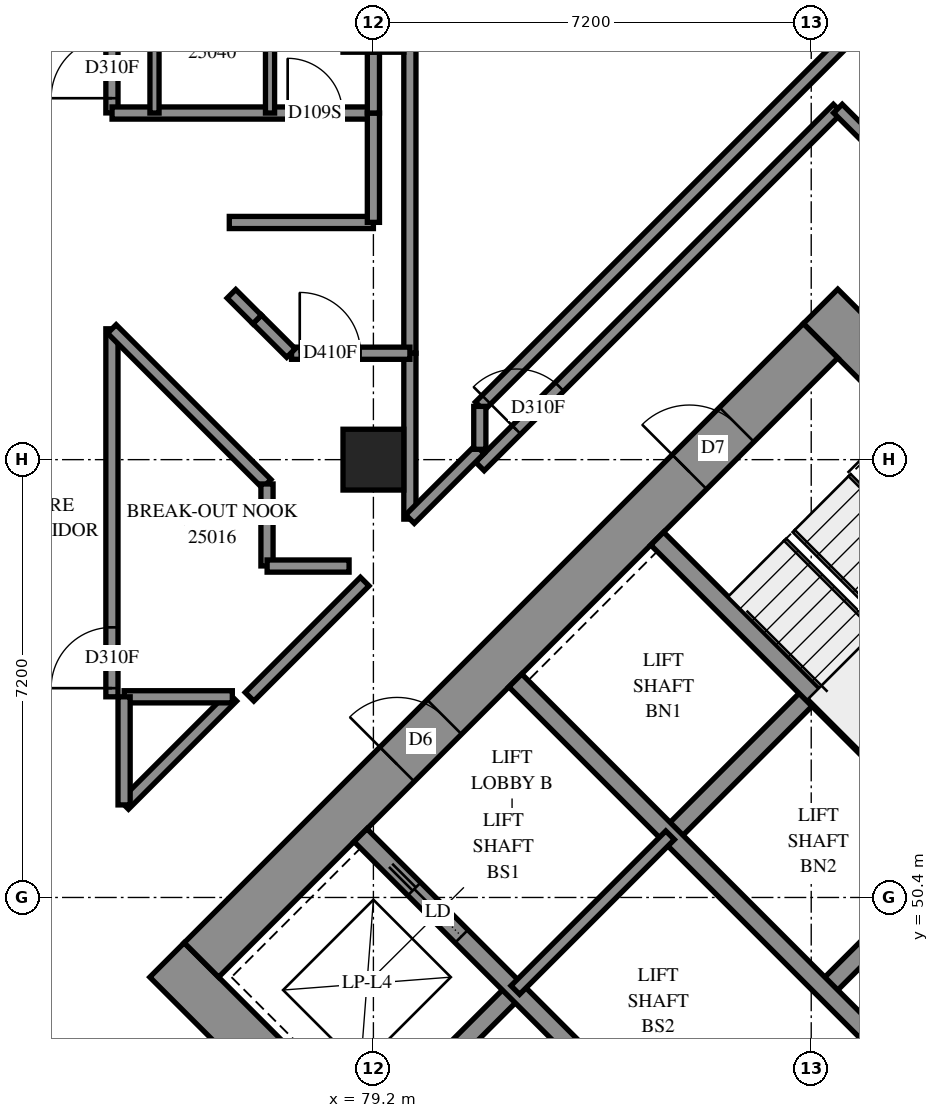
"""IFC4 building model, lengths in metres.
Left out: names, types, materials, properties, quantities, classifications, styles, units other than length and angle.
Written with IfcOpenShell. Run it as: python <this file> out.ifc"""

import sys

from ifc_helpers import new_model, si_unit, direction, frame, frame_2d, origin, origin_2d, place, context, subcontext, project, spatial, polyline, rectangle, outline, extrude, element, fill, save


model = new_model("IFC4")
c1 = context("Model", 3, precision=1e-05, world=origin(), true_north=direction((0.0, 1.0)))
c2 = subcontext(c1, "Body", "Model", "MODEL_VIEW")
j1 = project(units=[si_unit("LENGTHUNIT", "METRE"), si_unit("PLANEANGLEUNIT", "RADIAN")], contexts=[c1])
p1 = place(None, origin())
s1 = spatial("IfcSite", under=j1, at=p1, CompositionType="ELEMENT")
p2 = place(p1, origin())
s2 = spatial("IfcBuilding", under=s1, at=p2, CompositionType="ELEMENT")
p3 = place(p2, frame((0.0, 0.0, 94.8)))
s3 = spatial("IfcBuildingStorey", under=s2, at=p3, CompositionType="ELEMENT", Elevation=94.8)
p4 = place(p3, frame((79.2, 57.6, 0.0), z_axis=(0.0, 0.0, 1.0), x_axis=(1.0, 0.0, 0.0)))
e1 = element("IfcColumn", 1, at=p4, inside=s3, PredefinedType="COLUMN", context=c2, shape_type="SweptSolid", body=[
    extrude(rectangle(XDim=1.0, YDim=1.0, at=origin_2d()), origin(), (0.0, 0.0, 1.0), 3.1),
])
p5 = place(p3, frame((75.806, 49.373, -0.3), z_axis=(0.0, 0.0, 1.0), x_axis=(0.7071067812, -0.7071067812, 0.0)))
e2 = element("IfcWall", 2, at=p5, inside=s3, PredefinedType="SHEAR", context=c2, shape_type="SweptSolid", body=[
    extrude(rectangle(XDim=16.0, YDim=0.8, at=frame_2d((8.0, 0.0))), origin(), (0.0, 0.0, 1.0), 2.7),
])
p6 = place(p3, frame((86.554, 60.121, -0.3), z_axis=(0.0, 0.0, 1.0), x_axis=(0.7071067812, -0.7071067812, 0.0)))
e3 = element("IfcWall", 3, at=p6, inside=s3, PredefinedType="SHEAR", context=c2, shape_type="SweptSolid", body=[
    extrude(rectangle(XDim=16.0, YDim=0.8, at=frame_2d((8.0, 0.0))), origin(), (0.0, 0.0, 1.0), 2.7),
])
p7 = place(p6, frame((10.8, 0.0, 0.3)))
e4 = element("IfcOpeningElement", 4, at=p7, cuts=e3, PredefinedType="OPENING", context=c2, shape_type="SweptSolid", body=[
    extrude(rectangle(XDim=0.8, YDim=2.1, at=frame_2d((0.4, 1.05))), frame((0.0, 0.41, 0.0), z_axis=(0.0, -1.0, 0.0), x_axis=(1.0, 0.0, 0.0)), (0.0, 0.0, 1.0), 0.82),
])
p8 = place(p3, frame((76.372, 49.373, -0.3), z_axis=(0.0, 0.0, 1.0), x_axis=(0.7071067812, 0.7071067812, 0.0)))
e5 = element("IfcWall", 5, at=p8, inside=s3, PredefinedType="SHEAR", context=c2, shape_type="SweptSolid", body=[
    extrude(rectangle(XDim=14.4, YDim=0.8, at=frame_2d((7.2, 0.0))), origin(), (0.0, 0.0, 1.0), 2.7),
])
p9 = place(p8, frame((4.55, 0.0, 0.3)))
e6 = element("IfcOpeningElement", 6, at=p9, cuts=e5, PredefinedType="OPENING", context=c2, shape_type="SweptSolid", body=[
    extrude(rectangle(XDim=1.1, YDim=2.1, at=frame_2d((0.55, 1.05))), frame((0.0, 0.41, 0.0), z_axis=(0.0, -1.0, 0.0), x_axis=(1.0, 0.0, 0.0)), (0.0, 0.0, 1.0), 0.82),
])
p10 = place(p8, frame((11.35, 0.0, 0.3)))
e7 = element("IfcOpeningElement", 7, at=p10, cuts=e5, PredefinedType="OPENING", context=c2, shape_type="SweptSolid", body=[
    extrude(rectangle(XDim=1.1, YDim=2.1, at=frame_2d((0.55, 1.05))), frame((0.0, 0.41, 0.0), z_axis=(0.0, -1.0, 0.0), x_axis=(1.0, 0.0, 0.0)), (0.0, 0.0, 1.0), 0.82),
])
p11 = place(p3, frame((87.12, 38.625, -0.3), z_axis=(0.0, 0.0, 1.0), x_axis=(0.7071067812, 0.7071067812, 0.0)))
e8 = element("IfcWall", 8, at=p11, inside=s3, PredefinedType="SHEAR", context=c2, shape_type="SweptSolid", body=[
    extrude(rectangle(XDim=14.4, YDim=0.8, at=frame_2d((7.2, 0.0))), origin(), (0.0, 0.0, 1.0), 2.7),
])
p12 = place(p11, frame((4.55, 0.0, 0.3)))
e9 = element("IfcOpeningElement", 9, at=p12, cuts=e8, PredefinedType="OPENING", context=c2, shape_type="SweptSolid", body=[
    extrude(rectangle(XDim=1.1, YDim=2.1, at=frame_2d((0.55, 1.05))), frame((0.0, 0.41, 0.0), z_axis=(0.0, -1.0, 0.0), x_axis=(1.0, 0.0, 0.0)), (0.0, 0.0, 1.0), 0.82),
])
p13 = place(p11, frame((11.35, 0.0, 0.3)))
e10 = element("IfcOpeningElement", 10, at=p13, cuts=e8, PredefinedType="OPENING", context=c2, shape_type="SweptSolid", body=[
    extrude(rectangle(XDim=1.1, YDim=2.1, at=frame_2d((0.55, 1.05))), frame((0.0, 0.41, 0.0), z_axis=(0.0, -1.0, 0.0), x_axis=(1.0, 0.0, 0.0)), (0.0, 0.0, 1.0), 0.82),
])
for number, where, z_axis, x_axis in (
    (11, (79.2, 46.544, 0.0), (0.0, 0.0, 1.0), (0.707, 0.707, 0.0)),
    (12, (84.079, 51.423, 0.0), (0.0, 0.0, 1.0), (0.707, 0.707, 0.0)),
):
    element("IfcWall", number, at=place(p3, frame(where, z_axis=z_axis, x_axis=x_axis)), inside=s3, PredefinedType="SOLIDWALL", context=c2, shape_type="SweptSolid", body=[
        extrude(rectangle(XDim=3.3, YDim=0.3, at=frame_2d((1.65, 0.0))), origin(), (0.0, 0.0, 1.0), 3.1),
    ])
p14 = place(p3, frame((86.625, 48.878, 0.0), z_axis=(0.0, 0.0, 1.0), x_axis=(0.7071067812, 0.7071067812, 0.0)))
e13 = element("IfcWall", 13, at=p14, inside=s3, PredefinedType="SOLIDWALL", context=c2, shape_type="SweptSolid", body=[
    extrude(rectangle(XDim=3.3, YDim=0.3, at=frame_2d((1.65, 0.0))), origin(), (0.0, 0.0, 1.0), 3.1),
])
p15 = place(p3, frame((78.988, 51.423, 0.0), z_axis=(0.0, 0.0, 1.0), x_axis=(0.7071067812, -0.7071067812, 0.0)))
e14 = element("IfcWall", 14, at=p15, inside=s3, PredefinedType="SOLIDWALL", context=c2, shape_type="SweptSolid", body=[
    extrude(rectangle(XDim=14.4, YDim=0.3, at=frame_2d((7.2, 0.0))), origin(), (0.0, 0.0, 1.0), 3.1),
])
p16 = place(p15, frame((1.25, 0.0, 0.0)))
e15 = element("IfcOpeningElement", 15, at=p16, cuts=e14, PredefinedType="OPENING", context=c2, shape_type="SweptSolid", body=[
    extrude(rectangle(XDim=1.1, YDim=2.1, at=frame_2d((0.55, 1.05))), frame((0.0, 0.16, 0.0), z_axis=(0.0, -1.0, 0.0), x_axis=(1.0, 0.0, 0.0)), (0.0, 0.0, 1.0), 0.32),
])
p17 = place(p15, frame((4.85, 0.0, 0.0)))
e16 = element("IfcOpeningElement", 16, at=p17, cuts=e14, PredefinedType="OPENING", context=c2, shape_type="SweptSolid", body=[
    extrude(rectangle(XDim=1.1, YDim=2.1, at=frame_2d((0.55, 1.05))), frame((0.0, 0.16, 0.0), z_axis=(0.0, -1.0, 0.0), x_axis=(1.0, 0.0, 0.0)), (0.0, 0.0, 1.0), 0.32),
])
p18 = place(p15, frame((8.45, 0.0, 0.0)))
e17 = element("IfcOpeningElement", 17, at=p18, cuts=e14, PredefinedType="OPENING", context=c2, shape_type="SweptSolid", body=[
    extrude(rectangle(XDim=1.1, YDim=2.1, at=frame_2d((0.55, 1.05))), frame((0.0, 0.16, 0.0), z_axis=(0.0, -1.0, 0.0), x_axis=(1.0, 0.0, 0.0)), (0.0, 0.0, 1.0), 0.32),
])
p19 = place(p15, frame((12.05, 0.0, 0.0)))
e18 = element("IfcOpeningElement", 18, at=p19, cuts=e14, PredefinedType="OPENING", context=c2, shape_type="SweptSolid", body=[
    extrude(rectangle(XDim=1.1, YDim=2.1, at=frame_2d((0.55, 1.05))), frame((0.0, 0.16, 0.0), z_axis=(0.0, -1.0, 0.0), x_axis=(1.0, 0.0, 0.0)), (0.0, 0.0, 1.0), 0.32),
])
p20 = place(p3, frame((81.534, 53.969, 0.0), z_axis=(0.0, 0.0, 1.0), x_axis=(0.707103309, -0.7071102534, 0.0)))
e19 = element("IfcWall", 19, at=p20, inside=s3, PredefinedType="SOLIDWALL", context=c2, shape_type="SweptSolid", body=[
    extrude(rectangle(XDim=14.4, YDim=0.3, at=frame_2d((7.2, 0.0))), origin(), (0.0, 0.0, 1.0), 3.1),
])
p21 = place(p20, frame((12.05, 0.0, 0.0)))
e20 = element("IfcOpeningElement", 20, at=p21, cuts=e19, PredefinedType="OPENING", context=c2, shape_type="SweptSolid", body=[
    extrude(rectangle(XDim=1.1, YDim=2.1, at=frame_2d((0.55, 1.05))), frame((0.0, 0.16, 0.0), z_axis=(0.0, -1.0, 0.0), x_axis=(1.0, 0.0, 0.0)), (0.0, 0.0, 1.0), 0.32),
])
p22 = place(p3, frame((83.867, 56.302, 0.0), z_axis=(0.0, 0.0, 1.0), x_axis=(0.7071137256, -0.7070998367, 0.0)))
e21 = element("IfcWall", 21, at=p22, inside=s3, PredefinedType="SOLIDWALL", context=c2, shape_type="SweptSolid", body=[
    extrude(rectangle(XDim=7.2, YDim=0.3, at=frame_2d((3.6, 0.0))), origin(), (0.0, 0.0, 1.0), 3.1),
])
p23 = place(p3, frame((89.141, 63.96, 0.0), z_axis=(0.0, 0.0, 1.0), x_axis=(-0.788454577, 0.6150929849, 0.0)))
e22 = element("IfcWall", 22, at=p23, inside=s3, PredefinedType="SOLIDWALL", context=c2, shape_type="SweptSolid", body=[
    extrude(outline(polyline([(-0.034, -0.275), (3.401, -0.275), (3.468, 0.275), (0.034, 0.275), (-0.034, -0.275)])), origin(), (0.0, 0.0, 1.0), 3.1),
])
p24 = place(p23, frame((0.481, 0.0, 0.5)))
e23 = element("IfcOpeningElement", 23, at=p24, cuts=e22, PredefinedType="OPENING", context=c2, shape_type="SweptSolid", body=[
    extrude(rectangle(XDim=1.2, YDim=2.45, at=frame_2d((0.6, 1.225))), frame((0.0, 0.285, 0.0), z_axis=(0.0, -1.0, 0.0), x_axis=(1.0, 0.0, 0.0)), (0.0, 0.0, 1.0), 0.57),
])
p25 = place(p3, frame((81.534, 48.878, 0.0), z_axis=(0.0, 0.0, 1.0), x_axis=(0.707092892, 0.7071206701, 0.0)))
e24 = element("IfcWall", 24, at=p25, inside=s3, PredefinedType="PARTITIONING", context=c2, shape_type="SweptSolid", body=[
    extrude(rectangle(XDim=3.6, YDim=0.2, at=frame_2d((1.8, 0.0))), origin(), (0.0, 0.0, 1.0), 3.1),
])
p26 = place(p3, frame((79.8, 59.35, 0.0), z_axis=(0.0, 0.0, 1.0), x_axis=(0.0, 1.0, 0.0)))
e25 = element("IfcWall", 25, at=p26, inside=s3, PredefinedType="PARTITIONING", context=c2, shape_type="SweptSolid", body=[
    extrude(rectangle(XDim=14.215, YDim=0.2, at=frame_2d((7.108, 0.0))), origin(), (0.0, 0.0, 1.0), 3.1),
])
p27 = place(p3, frame((80.949, 58.477, 0.0), z_axis=(0.0, 0.0, 1.0), x_axis=(0.7071122423, 0.7071013201, 0.0)))
e26 = element("IfcWall", 26, at=p27, inside=s3, PredefinedType="PARTITIONING", context=c2, shape_type="SweptSolid", body=[
    extrude(rectangle(XDim=9.156, YDim=0.2, at=frame_2d((4.578, 0.0))), origin(), (0.0, 0.0, 1.0), 3.1),
])
p28 = place(p3, frame((80.951, 57.489, 0.0), z_axis=(0.0, 0.0, 1.0), x_axis=(0.7071067812, 0.7071067812, 0.0)))
e27 = element("IfcWall", 27, at=p28, inside=s3, PredefinedType="PARTITIONING", context=c2, shape_type="SweptSolid", body=[
    extrude(rectangle(XDim=8.321, YDim=0.2, at=frame_2d((4.161, 0.0))), origin(), (0.0, 0.0, 1.0), 3.1),
])
p29 = place(p28, frame((0.851, 0.0, 0.0)))
e28 = element("IfcOpeningElement", 28, at=p29, cuts=e27, PredefinedType="OPENING", context=c2, shape_type="SweptSolid", body=[
    extrude(rectangle(XDim=1.0, YDim=2.1, at=frame_2d((0.5, 1.05))), frame((0.0, 0.11, 0.0), z_axis=(0.0, -1.0, 0.0), x_axis=(1.0, 0.0, 0.0)), (0.0, 0.0, 1.0), 0.22),
])
p30 = place(p3, frame((74.9, 53.7, 0.0), z_axis=(0.0, 0.0, 1.0), x_axis=(0.0, 1.0, 0.0)))
e29 = element("IfcWall", 29, at=p30, inside=s3, PredefinedType="PARTITIONING", context=c2, shape_type="SweptSolid", body=[
    extrude(rectangle(XDim=6.052, YDim=0.2, at=frame_2d((3.026, 0.0))), origin(), (0.0, 0.0, 1.0), 3.1),
])
p31 = place(p30, frame((0.142, 0.0, 0.0)))
e30 = element("IfcOpeningElement", 30, at=p31, cuts=e29, PredefinedType="OPENING", context=c2, shape_type="SweptSolid", body=[
    extrude(rectangle(XDim=1.0, YDim=2.1, at=frame_2d((0.5, 1.05))), frame((0.0, 0.11, 0.0), z_axis=(0.0, -1.0, 0.0), x_axis=(1.0, 0.0, 0.0)), (0.0, 0.0, 1.0), 0.22),
])
p32 = place(p3, frame((74.9, 63.302, 0.0), z_axis=(0.0, 0.0, 1.0), x_axis=(0.0, 1.0, 0.0)))
e31 = element("IfcWall", 31, at=p32, inside=s3, PredefinedType="PARTITIONING", context=c2, shape_type="SweptSolid", body=[
    extrude(rectangle(XDim=4.398, YDim=0.2, at=frame_2d((2.199, 0.0))), origin(), (0.0, 0.0, 1.0), 3.1),
])
p33 = place(p32, frame((0.242, 0.0, 0.0)))
e32 = element("IfcOpeningElement", 32, at=p33, cuts=e31, PredefinedType="OPENING", context=c2, shape_type="SweptSolid", body=[
    extrude(rectangle(XDim=1.0, YDim=2.1, at=frame_2d((0.5, 1.05))), frame((0.0, 0.11, 0.0), z_axis=(0.0, -1.0, 0.0), x_axis=(1.0, 0.0, 0.0)), (0.0, 0.0, 1.0), 0.22),
])
p34 = place(p3, frame((74.902, 63.3, 0.0), z_axis=(0.0, 0.0, 1.0), x_axis=(1.0, 0.0, 0.0)))
e33 = element("IfcWall", 33, at=p34, inside=s3, PredefinedType="PARTITIONING", context=c2, shape_type="SweptSolid", body=[
    extrude(rectangle(XDim=4.298, YDim=0.2, at=frame_2d((2.149, 0.0))), origin(), (0.0, 0.0, 1.0), 3.1),
])
p35 = place(p34, frame((2.888, 0.0, 0.0)))
e34 = element("IfcOpeningElement", 34, at=p35, cuts=e33, PredefinedType="OPENING", context=c2, shape_type="SweptSolid", body=[
    extrude(rectangle(XDim=0.9, YDim=2.1, at=frame_2d((0.45, 1.05))), frame((0.0, 0.11, 0.0), z_axis=(0.0, -1.0, 0.0), x_axis=(1.0, 0.0, 0.0)), (0.0, 0.0, 1.0), 0.22),
])
p36 = place(p3, frame((74.899, 59.749, 0.0), z_axis=(0.0, 0.0, 1.0), x_axis=(0.7071067812, -0.7071067812, 0.0)))
e35 = element("IfcWall", 35, at=p36, inside=s3, PredefinedType="PARTITIONING", context=c2, shape_type="SweptSolid", body=[
    extrude(rectangle(XDim=3.601, YDim=0.2, at=frame_2d((1.8, 0.0))), origin(), (0.0, 0.0, 1.0), 3.1),
])
p37 = place(p3, frame((79.8, 56.622, 0.0), z_axis=(0.0, 0.0, 1.0), x_axis=(0.0, 1.0, 0.0)))
e36 = element("IfcWall", 36, at=p37, inside=s3, PredefinedType="PARTITIONING", context=c2, shape_type="SweptSolid", body=[
    extrude(rectangle(XDim=2.728, YDim=0.2, at=frame_2d((1.364, 0.0))), origin(), (0.0, 0.0, 1.0), 3.1),
])
p38 = place(p3, frame((77.163, 53.701, 0.0), z_axis=(0.0, 0.0, 1.0), x_axis=(0.7071067812, 0.7071067812, 0.0)))
e37 = element("IfcWall", 37, at=p38, inside=s3, PredefinedType="PARTITIONING", context=c2, shape_type="SweptSolid", body=[
    extrude(rectangle(XDim=2.679, YDim=0.2, at=frame_2d((1.339, 0.0))), origin(), (0.0, 0.0, 1.0), 3.1),
])
p39 = place(p3, frame((75.102, 51.922, 0.0), z_axis=(0.0, 0.0, 1.0), x_axis=(0.7071067812, 0.7071067812, 0.0)))
e38 = element("IfcWall", 38, at=p39, inside=s3, PredefinedType="PARTITIONING", context=c2, shape_type="SweptSolid", body=[
    extrude(rectangle(XDim=2.514, YDim=0.2, at=frame_2d((1.257, 0.0))), origin(), (0.0, 0.0, 1.0), 3.1),
])
for number, where, z_axis, x_axis in (
    (39, (75.6, 63.3, 0.0), (0.0, 0.0, 1.0), (0.0, 1.0, 0.0)),
    (40, (77.5, 63.3, 0.0), (0.0, 0.0, 1.0), (0.0, 1.0, 0.0)),
):
    element("IfcWall", number, at=place(p3, frame(where, z_axis=z_axis, x_axis=x_axis)), inside=s3, PredefinedType="PARTITIONING", context=c2, shape_type="SweptSolid", body=[
        extrude(rectangle(XDim=2.4, YDim=0.15, at=frame_2d((1.2, 0.0))), origin(), (0.0, 0.0, 1.0), 3.1),
    ])
p40 = place(p3, frame((76.83, 61.5, 0.0), z_axis=(0.0, 0.0, 1.0), x_axis=(1.0, 0.0, 0.0)))
e41 = element("IfcWall", 41, at=p40, inside=s3, PredefinedType="PARTITIONING", context=c2, shape_type="SweptSolid", body=[
    extrude(rectangle(XDim=2.37, YDim=0.2, at=frame_2d((1.185, 0.0))), origin(), (0.0, 0.0, 1.0), 3.1),
])
p41 = place(p3, frame((77.854, 59.35, 0.0), z_axis=(0.0, 0.0, 1.0), x_axis=(1.0, 0.0, 0.0)))
e42 = element("IfcWall", 42, at=p41, inside=s3, PredefinedType="PARTITIONING", context=c2, shape_type="SweptSolid", body=[
    extrude(rectangle(XDim=1.946, YDim=0.2, at=frame_2d((0.973, 0.0))), origin(), (0.0, 0.0, 1.0), 3.1),
])
p42 = place(p41, frame((0.135, 0.0, 0.0)))
e43 = element("IfcOpeningElement", 43, at=p42, cuts=e42, PredefinedType="OPENING", context=c2, shape_type="SweptSolid", body=[
    extrude(rectangle(XDim=1.0, YDim=2.1, at=frame_2d((0.5, 1.05))), frame((0.0, 0.11, 0.0), z_axis=(0.0, -1.0, 0.0), x_axis=(1.0, 0.0, 0.0)), (0.0, 0.0, 1.0), 0.22),
])
p43 = place(p3, frame((79.2, 61.502, 0.0), z_axis=(0.0, 0.0, 1.0), x_axis=(0.0, 1.0, 0.0)))
e44 = element("IfcWall", 44, at=p43, inside=s3, PredefinedType="PARTITIONING", context=c2, shape_type="SweptSolid", body=[
    extrude(rectangle(XDim=1.798, YDim=0.2, at=frame_2d((0.899, 0.0))), origin(), (0.0, 0.0, 1.0), 3.1),
])
p44 = place(p3, frame((75.1, 53.7, 0.0), z_axis=(0.0, 0.0, 1.0), x_axis=(1.0, 0.0, 0.0)))
e45 = element("IfcWall", 45, at=p44, inside=s3, PredefinedType="PARTITIONING", context=c2, shape_type="SweptSolid", body=[
    extrude(rectangle(XDim=1.78, YDim=0.2, at=frame_2d((0.89, 0.0))), origin(), (0.0, 0.0, 1.0), 3.1),
])
p45 = place(p3, frame((75.1, 51.922, 0.0), z_axis=(0.0, 0.0, 1.0), x_axis=(0.0, 1.0, 0.0)))
e46 = element("IfcWall", 46, at=p45, inside=s3, PredefinedType="PARTITIONING", context=c2, shape_type="SweptSolid", body=[
    extrude(rectangle(XDim=1.778, YDim=0.2, at=frame_2d((0.889, 0.0))), origin(), (0.0, 0.0, 1.0), 3.1),
])
p46 = place(p3, frame((79.802, 56.623, 0.0), z_axis=(0.0, 0.0, 1.0), x_axis=(0.7071067812, 0.7071067812, 0.0)))
e47 = element("IfcWall", 47, at=p46, inside=s3, PredefinedType="PARTITIONING", context=c2, shape_type="SweptSolid", body=[
    extrude(rectangle(XDim=1.623, YDim=0.2, at=frame_2d((0.812, 0.0))), origin(), (0.0, 0.0, 1.0), 3.1),
])
p47 = place(p3, frame((86.839, 63.373, 0.0), z_axis=(0.0, 0.0, 1.0), x_axis=(0.7077963046, -0.7064165847, 0.0)))
e48 = element("IfcWall", 48, at=p47, inside=s3, PredefinedType="PARTITIONING", context=c2, shape_type="SweptSolid", body=[
    extrude(rectangle(XDim=1.45, YDim=0.2, at=frame_2d((0.725, 0.0))), origin(), (0.0, 0.0, 1.0), 3.1),
])
for number, where, z_axis, x_axis in (
    (49, (77.45, 55.852, 0.0), (0.0, 0.0, 1.0), (0.0, 1.0, 0.0)),
    (50, (77.452, 55.85, 0.0), (0.0, 0.0, 1.0), (1.0, 0.0, 0.0)),
):
    element("IfcWall", number, at=place(p3, frame(where, z_axis=z_axis, x_axis=x_axis)), inside=s3, PredefinedType="PARTITIONING", context=c2, shape_type="SweptSolid", body=[
        extrude(rectangle(XDim=1.348, YDim=0.2, at=frame_2d((0.674, 0.0))), origin(), (0.0, 0.0, 1.0), 3.1),
    ])
p48 = place(p3, frame((79.2, 63.3, 0.0), z_axis=(0.0, 0.0, 1.0), x_axis=(0.0, 1.0, 0.0)))
e51 = element("IfcWall", 51, at=p48, inside=s3, PredefinedType="PARTITIONING", context=c2, shape_type="SweptSolid", body=[
    extrude(rectangle(XDim=1.0, YDim=0.2, at=frame_2d((0.5, 0.0))), origin(), (0.0, 0.0, 1.0), 3.1),
])
p49 = place(p3, frame((77.289, 59.907, 0.0), z_axis=(0.0, 0.0, 1.0), x_axis=(0.7083796976, -0.7058315692, 0.0)))
e52 = element("IfcWall", 52, at=p49, inside=s3, PredefinedType="PARTITIONING", context=c2, shape_type="SweptSolid", body=[
    extrude(rectangle(XDim=0.785, YDim=0.2, at=frame_2d((0.393, 0.0))), origin(), (0.0, 0.0, 1.0), 3.1),
])
p50 = place(p3, frame((80.95, 57.77, 0.0), z_axis=(0.0, 0.0, 1.0), x_axis=(0.0, 1.0, 0.0)))
e53 = element("IfcWall", 53, at=p50, inside=s3, PredefinedType="PARTITIONING", context=c2, shape_type="SweptSolid", body=[
    extrude(rectangle(XDim=0.706, YDim=0.2, at=frame_2d((0.353, 0.0))), origin(), (0.0, 0.0, 1.0), 3.1),
])
p51 = place(p3, frame((76.865, 60.327, 0.0), z_axis=(0.0, 0.0, 1.0), x_axis=(0.7071067812, -0.7071067812, 0.0)))
e54 = element("IfcWall", 54, at=p51, inside=s3, PredefinedType="PARTITIONING", context=c2, shape_type="SweptSolid", body=[
    extrude(rectangle(XDim=0.597, YDim=0.2, at=frame_2d((0.298, 0.0))), origin(), (0.0, 0.0, 1.0), 3.1),
])
p52 = place(p9, origin())
e55 = element("IfcDoor", 55, at=p52, inside=s3, OperationType="DOUBLE_DOOR_SINGLE_SWING", PredefinedType="DOOR", context=c2, shape_type="SweptSolid", body=[
    extrude(rectangle(XDim=1.1, YDim=2.1, at=frame_2d((0.55, 1.05))), frame((0.0, 0.025, 0.0), z_axis=(0.0, -1.0, 0.0), x_axis=(1.0, 0.0, 0.0)), (0.0, 0.0, 1.0), 0.05),
])
fill(e6, e55)
p53 = place(p10, origin())
e56 = element("IfcDoor", 56, at=p53, inside=s3, OperationType="SINGLE_SWING_LEFT", PredefinedType="DOOR", context=c2, shape_type="SweptSolid", body=[
    extrude(rectangle(XDim=1.1, YDim=2.1, at=frame_2d((0.55, 1.05))), frame((0.0, 0.025, 0.0), z_axis=(0.0, -1.0, 0.0), x_axis=(1.0, 0.0, 0.0)), (0.0, 0.0, 1.0), 0.05),
])
fill(e7, e56)
p54 = place(p16, origin())
e57 = element("IfcDoor", 57, at=p54, inside=s3, OperationType="SLIDING_TO_LEFT", PredefinedType="DOOR", context=c2, shape_type="SweptSolid", body=[
    extrude(rectangle(XDim=1.1, YDim=2.1, at=frame_2d((0.55, 1.05))), frame((0.0, 0.025, 0.0), z_axis=(0.0, -1.0, 0.0), x_axis=(1.0, 0.0, 0.0)), (0.0, 0.0, 1.0), 0.05),
])
fill(e15, e57)
p55 = place(p31, origin())
e58 = element("IfcDoor", 58, at=p55, inside=s3, OperationType="SINGLE_SWING_LEFT", PredefinedType="DOOR", context=c2, shape_type="SweptSolid", body=[
    extrude(rectangle(XDim=1.0, YDim=2.1, at=frame_2d((0.5, 1.05))), frame((0.0, 0.025, 0.0), z_axis=(0.0, -1.0, 0.0), x_axis=(1.0, 0.0, 0.0)), (0.0, 0.0, 1.0), 0.05),
])
fill(e30, e58)
p56 = place(p33, origin())
e59 = element("IfcDoor", 59, at=p56, inside=s3, OperationType="SINGLE_SWING_RIGHT", PredefinedType="DOOR", context=c2, shape_type="SweptSolid", body=[
    extrude(rectangle(XDim=1.0, YDim=2.1, at=frame_2d((0.5, 1.05))), frame((0.0, 0.025, 0.0), z_axis=(0.0, -1.0, 0.0), x_axis=(1.0, 0.0, 0.0)), (0.0, 0.0, 1.0), 0.05),
])
fill(e32, e59)
p57 = place(p35, origin())
e60 = element("IfcDoor", 60, at=p57, inside=s3, OperationType="SINGLE_SWING_LEFT", PredefinedType="DOOR", context=c2, shape_type="SweptSolid", body=[
    extrude(rectangle(XDim=0.9, YDim=2.1, at=frame_2d((0.45, 1.05))), frame((0.0, 0.025, 0.0), z_axis=(0.0, -1.0, 0.0), x_axis=(1.0, 0.0, 0.0)), (0.0, 0.0, 1.0), 0.05),
])
fill(e34, e60)
p58 = place(p42, origin())
e61 = element("IfcDoor", 61, at=p58, inside=s3, OperationType="SINGLE_SWING_LEFT", PredefinedType="DOOR", context=c2, shape_type="SweptSolid", body=[
    extrude(rectangle(XDim=1.0, YDim=2.1, at=frame_2d((0.5, 1.05))), frame((0.0, 0.025, 0.0), z_axis=(0.0, -1.0, 0.0), x_axis=(1.0, 0.0, 0.0)), (0.0, 0.0, 1.0), 0.05),
])
fill(e43, e61)
p59 = place(p29, origin())
e62 = element("IfcDoor", 62, at=p59, inside=s3, OperationType="SINGLE_SWING_RIGHT", PredefinedType="DOOR", context=c2, shape_type="SweptSolid", body=[
    extrude(rectangle(XDim=1.0, YDim=2.1, at=frame_2d((0.5, 1.05))), frame((0.0, 0.025, 0.0), z_axis=(0.0, -1.0, 0.0), x_axis=(1.0, 0.0, 0.0)), (0.0, 0.0, 1.0), 0.05),
])
fill(e28, e62)
save(model, sys.argv[1])
